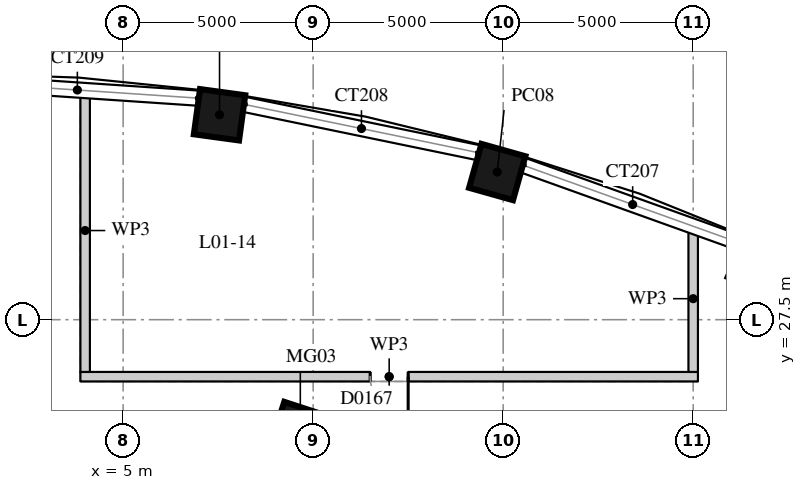
"""IFC4 building model, lengths in metres.
Left out: names, types, materials, properties, quantities, classifications, styles, units other than length and angle.
Written with IfcOpenShell. Run it as: python <this file> out.ifc"""

import sys

from ifc_helpers import new_model, si_unit, direction, frame, frame_2d, origin, origin_2d, place, context, subcontext, project, spatial, rectangle, extrude, element, fill, save


model = new_model("IFC4")
c1 = context("Model", 3, precision=1e-05, world=origin(), true_north=direction((0.0, 1.0)))
c2 = subcontext(c1, "Body", "Model", "MODEL_VIEW")
j1 = project(units=[si_unit("LENGTHUNIT", "METRE"), si_unit("PLANEANGLEUNIT", "RADIAN")], contexts=[c1])
p1 = place(None, origin())
s1 = spatial("IfcSite", under=j1, at=p1, CompositionType="ELEMENT")
p2 = place(p1, origin())
s2 = spatial("IfcBuilding", under=s1, at=p2, CompositionType="ELEMENT")
p3 = place(p2, frame((0.0, 0.0, 7.5)))
s3 = spatial("IfcBuildingStorey", under=s2, at=p3, CompositionType="ELEMENT", Elevation=7.5)
p4 = place(p3, frame((9.662, 23.727, 0.0), z_axis=(0.0, 0.0, 1.0), x_axis=(0.310219183529, 0.950665060981, 0.0)))
e1 = element("IfcColumn", 1, at=p4, inside=s3, PredefinedType="COLUMN", context=c2, shape_type="SweptSolid", body=[
    extrude(rectangle(XDim=2.8, YDim=1.8, at=origin_2d()), origin(), (0.0, 0.0, 1.0), 5.0),
])
for number, where, z_axis, x_axis in (
    (2, (14.844, 31.386, 0.0), (0.0, 0.0, 1.0), (0.271, 0.963, 0.0)),
    (3, (7.536, 32.893, 0.0), (0.0, 0.0, 1.0), (0.135, 0.991, 0.0)),
):
    element("IfcColumn", number, at=place(p3, frame(where, z_axis=z_axis, x_axis=x_axis)), inside=s3, PredefinedType="COLUMN", context=c2, shape_type="SweptSolid", body=[
        extrude(rectangle(XDim=1.2, YDim=1.2, at=origin_2d()), origin(), (0.0, 0.0, 1.0), 5.0),
    ])
p5 = place(p3, frame((3.875, 26.0, 0.0), z_axis=(0.0, 0.0, 1.0), x_axis=(1.0, 0.0, 0.0)))
e4 = element("IfcWall", 4, at=p5, inside=s3, PredefinedType="PARTITIONING", context=c2, shape_type="SweptSolid", body=[
    extrude(rectangle(XDim=16.25, YDim=0.25, at=frame_2d((8.125, 0.0))), origin(), (0.0, 0.0, 1.0), 4.59),
])
p6 = place(p5, frame((7.625, 0.0, 0.0)))
e5 = element("IfcOpeningElement", 5, at=p6, cuts=e4, PredefinedType="OPENING", context=c2, shape_type="SweptSolid", body=[
    extrude(rectangle(XDim=1.0, YDim=2.1, at=frame_2d((0.5, 1.05))), frame((0.0, 0.135, 0.0), z_axis=(0.0, -1.0, 0.0), x_axis=(1.0, 0.0, 0.0)), (0.0, 0.0, 1.0), 0.27),
])
p7 = place(p3, frame((4.0, 26.125, 0.0), z_axis=(0.0, 0.0, 1.0), x_axis=(0.0, 1.0, 0.0)))
e6 = element("IfcWall", 6, at=p7, inside=s3, PredefinedType="PARTITIONING", context=c2, shape_type="SweptSolid", body=[
    extrude(rectangle(XDim=7.442, YDim=0.25, at=frame_2d((3.721, 0.0))), origin(), (0.0, 0.0, 1.0), 4.59),
])
p8 = place(p3, frame((20.0, 26.125, 0.0), z_axis=(0.0, 0.0, 1.0), x_axis=(0.0, 1.0, 0.0)))
e7 = element("IfcWall", 7, at=p8, inside=s3, PredefinedType="PARTITIONING", context=c2, shape_type="SweptSolid", body=[
    extrude(rectangle(XDim=3.856, YDim=0.25, at=frame_2d((1.928, 0.0))), origin(), (0.0, 0.0, 1.0), 4.59),
])
p9 = place(p6, origin())
e8 = element("IfcDoor", 8, at=p9, inside=s3, OperationType="SINGLE_SWING_LEFT", PredefinedType="DOOR", context=c2, shape_type="SweptSolid", body=[
    extrude(rectangle(XDim=1.0, YDim=2.1, at=frame_2d((0.5, 1.05))), frame((0.0, 0.025, 0.0), z_axis=(0.0, -1.0, 0.0), x_axis=(1.0, 0.0, 0.0)), (0.0, 0.0, 1.0), 0.05),
])
fill(e5, e8)
save(model, sys.argv[1])
